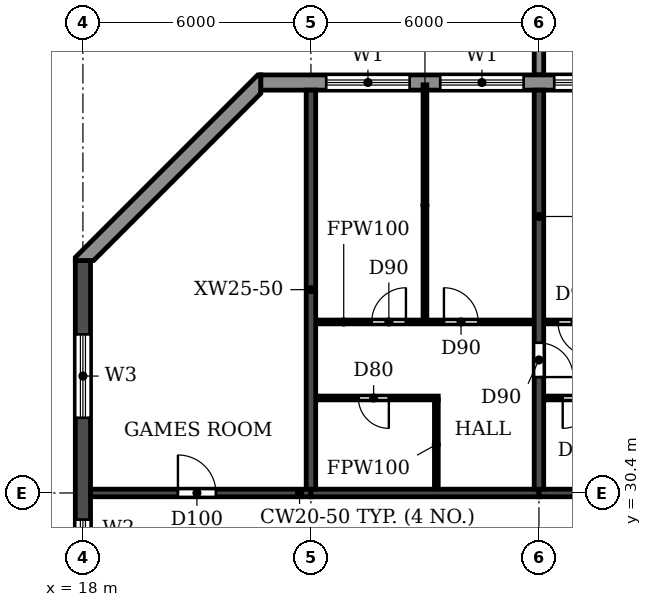
"""IFC4 building model, lengths in metres.
Left out: names, types, materials, properties, quantities, classifications, styles, units other than length and angle.
Written with IfcOpenShell. Run it as: python <this file> out.ifc"""

import sys

from ifc_helpers import new_model, si_unit, direction, frame, frame_2d, origin, place, context, subcontext, project, spatial, polyline, rectangle, outline, extrude, source, transform, mapped, element, fill, save


model = new_model("IFC4")
c1 = context("Model", 3, precision=1e-05, world=origin(), true_north=direction((0.0, 1.0)))
c2 = subcontext(c1, "Body", "Model", "MODEL_VIEW")
j1 = project(units=[si_unit("LENGTHUNIT", "METRE"), si_unit("PLANEANGLEUNIT", "RADIAN")], contexts=[c1])
p1 = place(None, origin())
s1 = spatial("IfcSite", under=j1, at=p1, CompositionType="ELEMENT")
p2 = place(p1, origin())
s2 = spatial("IfcBuilding", under=s1, at=p2, CompositionType="ELEMENT")
p3 = place(p2, frame((0.0, 0.0, 257.7)))
s3 = spatial("IfcBuildingStorey", under=s2, at=p3, CompositionType="ELEMENT", Elevation=257.7)
p4 = place(p3, frame((24.0, 30.5, 0.0), z_axis=(0.0, 0.0, 1.0), x_axis=(0.0, 1.0, 0.0)))
e1 = element("IfcWall", 1, at=p4, inside=s3, PredefinedType="SHEAR", context=c2, shape_type="SweptSolid", body=[
    extrude(rectangle(XDim=10.5, YDim=0.25, at=frame_2d((5.25, 0.0))), origin(), (0.0, 0.0, 1.0), 3.0),
])
p5 = place(p3, frame((30.0, 30.5, 0.0), z_axis=(0.0, 0.0, 1.0), x_axis=(0.0, 1.0, 0.0)))
e2 = element("IfcWall", 2, at=p5, inside=s3, PredefinedType="SHEAR", context=c2, shape_type="SweptSolid", body=[
    extrude(rectangle(XDim=10.5, YDim=0.25, at=frame_2d((5.25, 0.0))), origin(), (0.0, 0.0, 1.0), 2.1),
])
p6 = place(p5, frame((2.95, 0.0, 0.0)))
e3 = element("IfcOpeningElement", 3, at=p6, cuts=e2, PredefinedType="OPENING", context=c2, shape_type="SweptSolid", body=[
    extrude(rectangle(XDim=0.9, YDim=2.1, at=frame_2d((0.45, 1.05))), frame((0.0, 0.135, 0.0), z_axis=(0.0, -1.0, 0.0), x_axis=(1.0, 0.0, 0.0)), (0.0, 0.0, 1.0), 0.27),
])
p7 = place(p3, frame((18.0, 4.683, 0.0), z_axis=(0.0, 0.0, 1.0), x_axis=(0.0, 1.0, 0.0)))
e4 = element("IfcWall", 4, at=p7, inside=s3, PredefinedType="SHEAR", context=c2, shape_type="SweptSolid", body=[
    extrude(rectangle(XDim=31.834, YDim=0.4, at=frame_2d((15.917, 0.0))), origin(), (0.0, 0.0, 1.0), 3.0),
])
p8 = place(p7, frame((23.817, 0.0, 0.9)))
e5 = element("IfcOpeningElement", 5, at=p8, cuts=e4, PredefinedType="OPENING", context=c2, shape_type="SweptSolid", body=[
    extrude(rectangle(XDim=1.2, YDim=1.5, at=frame_2d((0.6, 0.75))), frame((0.0, 0.21, 0.0), z_axis=(0.0, -1.0, 0.0), x_axis=(1.0, 0.0, 0.0)), (0.0, 0.0, 1.0), 0.42),
])
p9 = place(p7, frame((8.017, 0.0, 0.9)))
e6 = element("IfcOpeningElement", 6, at=p9, cuts=e4, PredefinedType="OPENING", context=c2, shape_type="SweptSolid", body=[
    extrude(rectangle(XDim=1.2, YDim=1.5, at=frame_2d((0.6, 0.75))), frame((0.0, 0.21, 0.0), z_axis=(0.0, -1.0, 0.0), x_axis=(1.0, 0.0, 0.0)), (0.0, 0.0, 1.0), 0.42),
])
p10 = place(p7, frame((27.694, 0.0, 0.6)))
e7 = element("IfcOpeningElement", 7, at=p10, cuts=e4, PredefinedType="OPENING", context=c2, shape_type="SweptSolid", body=[
    extrude(rectangle(XDim=2.2, YDim=1.8, at=frame_2d((1.1, 0.9))), frame((0.0, 0.21, 0.0), z_axis=(0.0, -1.0, 0.0), x_axis=(1.0, 0.0, 0.0)), (0.0, 0.0, 1.0), 0.42),
])
p11 = place(p7, frame((2.541, 0.0, 0.6)))
e8 = element("IfcOpeningElement", 8, at=p11, cuts=e4, PredefinedType="OPENING", context=c2, shape_type="SweptSolid", body=[
    extrude(rectangle(XDim=2.2, YDim=1.8, at=frame_2d((1.1, 0.9))), frame((0.0, 0.21, 0.0), z_axis=(0.0, -1.0, 0.0), x_axis=(1.0, 0.0, 0.0)), (0.0, 0.0, 1.0), 0.42),
])
p12 = place(p7, frame((15.917, 0.0, 0.9)))
e9 = element("IfcOpeningElement", 9, at=p12, cuts=e4, PredefinedType="OPENING", context=c2, shape_type="SweptSolid", body=[
    extrude(rectangle(XDim=1.2, YDim=1.5, at=frame_2d((0.6, 0.75))), frame((0.0, 0.21, 0.0), z_axis=(0.0, -1.0, 0.0), x_axis=(1.0, 0.0, 0.0)), (0.0, 0.0, 1.0), 0.42),
])
p13 = place(p3, frame((18.2, 30.4, 0.0), z_axis=(0.0, 0.0, 1.0), x_axis=(1.0, 0.0, 0.0)))
e10 = element("IfcWall", 10, at=p13, inside=s3, PredefinedType="SHEAR", context=c2, shape_type="SweptSolid", body=[
    extrude(rectangle(XDim=5.8, YDim=0.2, at=frame_2d((2.9, 0.0))), origin(), (0.0, 0.0, 1.0), 2.4),
])
p14 = place(p13, frame((2.3, 0.0, 0.0)))
e11 = element("IfcOpeningElement", 11, at=p14, cuts=e10, PredefinedType="OPENING", context=c2, shape_type="SweptSolid", body=[
    extrude(rectangle(XDim=1.0, YDim=2.1, at=frame_2d((0.5, 1.05))), frame((0.0, 0.11, 0.0), z_axis=(0.0, -1.0, 0.0), x_axis=(1.0, 0.0, 0.0)), (0.0, 0.0, 1.0), 0.22),
])
p15 = place(p3, frame((24.0, 30.4, 0.0), z_axis=(0.0, 0.0, 1.0), x_axis=(1.0, 0.0, 0.0)))
e12 = element("IfcWall", 12, at=p15, inside=s3, PredefinedType="SHEAR", context=c2, shape_type="SweptSolid", body=[
    extrude(rectangle(XDim=6.0, YDim=0.2, at=frame_2d((3.0, 0.0))), origin(), (0.0, 0.0, 1.0), 2.4),
])
p16 = place(p3, frame((30.0, 30.4, 0.0), z_axis=(0.0, 0.0, 1.0), x_axis=(1.0, 0.0, 0.0)))
e13 = element("IfcWall", 13, at=p16, inside=s3, PredefinedType="SHEAR", context=c2, shape_type="SweptSolid", body=[
    extrude(rectangle(XDim=6.0, YDim=0.2, at=frame_2d((3.0, 0.0))), origin(), (0.0, 0.0, 1.0), 2.4),
])
p17 = place(p16, frame((2.45, 0.0, 0.0)))
e14 = element("IfcOpeningElement", 14, at=p17, cuts=e13, PredefinedType="OPENING", context=c2, shape_type="SweptSolid", body=[
    extrude(rectangle(XDim=1.0, YDim=2.1, at=frame_2d((0.5, 1.05))), frame((0.0, 0.11, 0.0), z_axis=(0.0, -1.0, 0.0), x_axis=(1.0, 0.0, 0.0)), (0.0, 0.0, 1.0), 0.22),
])
p18 = place(p3, frame((79.317, 41.2, 0.0), z_axis=(0.0, 0.0, 1.0), x_axis=(-1.0, 0.0, 0.0)))
e15 = element("IfcWall", 15, at=p18, inside=s3, PredefinedType="STANDARD", context=c2, shape_type="SweptSolid", body=[
    extrude(rectangle(XDim=56.634, YDim=0.4, at=frame_2d((28.317, 0.0))), origin(), (0.0, 0.0, 1.0), 3.0),
])
p19 = place(p18, frame((52.717, 0.0, 0.9)))
e16 = element("IfcOpeningElement", 16, at=p19, cuts=e15, PredefinedType="OPENING", context=c2, shape_type="SweptSolid", body=[
    extrude(rectangle(XDim=2.2, YDim=1.5, at=frame_2d((1.1, 0.75))), frame((0.0, 0.21, 0.0), z_axis=(0.0, -1.0, 0.0), x_axis=(1.0, 0.0, 0.0)), (0.0, 0.0, 1.0), 0.42),
])
p20 = place(p18, frame((49.717, 0.0, 0.9)))
e17 = element("IfcOpeningElement", 17, at=p20, cuts=e15, PredefinedType="OPENING", context=c2, shape_type="SweptSolid", body=[
    extrude(rectangle(XDim=2.2, YDim=1.5, at=frame_2d((1.1, 0.75))), frame((0.0, 0.21, 0.0), z_axis=(0.0, -1.0, 0.0), x_axis=(1.0, 0.0, 0.0)), (0.0, 0.0, 1.0), 0.42),
])
p21 = place(p18, frame((46.717, 0.0, 0.9)))
e18 = element("IfcOpeningElement", 18, at=p21, cuts=e15, PredefinedType="OPENING", context=c2, shape_type="SweptSolid", body=[
    extrude(rectangle(XDim=2.2, YDim=1.5, at=frame_2d((1.1, 0.75))), frame((0.0, 0.21, 0.0), z_axis=(0.0, -1.0, 0.0), x_axis=(1.0, 0.0, 0.0)), (0.0, 0.0, 1.0), 0.42),
])
p22 = place(p18, frame((43.917, 0.0, 0.0)))
e19 = element("IfcOpeningElement", 19, at=p22, cuts=e15, PredefinedType="OPENING", context=c2, shape_type="SweptSolid", body=[
    extrude(rectangle(XDim=1.8, YDim=2.4, at=frame_2d((0.9, 1.2))), frame((0.0, 0.21, 0.0), z_axis=(0.0, -1.0, 0.0), x_axis=(1.0, 0.0, 0.0)), (0.0, 0.0, 1.0), 0.42),
])
p23 = place(p18, frame((40.717, 0.0, 0.9)))
e20 = element("IfcOpeningElement", 20, at=p23, cuts=e15, PredefinedType="OPENING", context=c2, shape_type="SweptSolid", body=[
    extrude(rectangle(XDim=2.2, YDim=1.5, at=frame_2d((1.1, 0.75))), frame((0.0, 0.21, 0.0), z_axis=(0.0, -1.0, 0.0), x_axis=(1.0, 0.0, 0.0)), (0.0, 0.0, 1.0), 0.42),
])
p24 = place(p18, frame((37.917, 0.0, 0.0)))
e21 = element("IfcOpeningElement", 21, at=p24, cuts=e15, PredefinedType="OPENING", context=c2, shape_type="SweptSolid", body=[
    extrude(rectangle(XDim=1.8, YDim=2.4, at=frame_2d((0.9, 1.2))), frame((0.0, 0.21, 0.0), z_axis=(0.0, -1.0, 0.0), x_axis=(1.0, 0.0, 0.0)), (0.0, 0.0, 1.0), 0.42),
])
p25 = place(p18, frame((34.717, 0.0, 0.9)))
e22 = element("IfcOpeningElement", 22, at=p25, cuts=e15, PredefinedType="OPENING", context=c2, shape_type="SweptSolid", body=[
    extrude(rectangle(XDim=2.2, YDim=1.5, at=frame_2d((1.1, 0.75))), frame((0.0, 0.21, 0.0), z_axis=(0.0, -1.0, 0.0), x_axis=(1.0, 0.0, 0.0)), (0.0, 0.0, 1.0), 0.42),
])
p26 = place(p18, frame((31.717, 0.0, 0.9)))
e23 = element("IfcOpeningElement", 23, at=p26, cuts=e15, PredefinedType="OPENING", context=c2, shape_type="SweptSolid", body=[
    extrude(rectangle(XDim=2.2, YDim=1.5, at=frame_2d((1.1, 0.75))), frame((0.0, 0.21, 0.0), z_axis=(0.0, -1.0, 0.0), x_axis=(1.0, 0.0, 0.0)), (0.0, 0.0, 1.0), 0.42),
])
p27 = place(p18, frame((28.717, 0.0, 0.9)))
e24 = element("IfcOpeningElement", 24, at=p27, cuts=e15, PredefinedType="OPENING", context=c2, shape_type="SweptSolid", body=[
    extrude(rectangle(XDim=2.2, YDim=1.5, at=frame_2d((1.1, 0.75))), frame((0.0, 0.21, 0.0), z_axis=(0.0, -1.0, 0.0), x_axis=(1.0, 0.0, 0.0)), (0.0, 0.0, 1.0), 0.42),
])
p28 = place(p18, frame((25.917, 0.0, 0.0)))
e25 = element("IfcOpeningElement", 25, at=p28, cuts=e15, PredefinedType="OPENING", context=c2, shape_type="SweptSolid", body=[
    extrude(rectangle(XDim=1.8, YDim=2.4, at=frame_2d((0.9, 1.2))), frame((0.0, 0.21, 0.0), z_axis=(0.0, -1.0, 0.0), x_axis=(1.0, 0.0, 0.0)), (0.0, 0.0, 1.0), 0.42),
])
p29 = place(p18, frame((22.917, 0.0, 0.0)))
e26 = element("IfcOpeningElement", 26, at=p29, cuts=e15, PredefinedType="OPENING", context=c2, shape_type="SweptSolid", body=[
    extrude(rectangle(XDim=1.8, YDim=2.4, at=frame_2d((0.9, 1.2))), frame((0.0, 0.21, 0.0), z_axis=(0.0, -1.0, 0.0), x_axis=(1.0, 0.0, 0.0)), (0.0, 0.0, 1.0), 0.42),
])
p30 = place(p18, frame((19.717, 0.0, 0.9)))
e27 = element("IfcOpeningElement", 27, at=p30, cuts=e15, PredefinedType="OPENING", context=c2, shape_type="SweptSolid", body=[
    extrude(rectangle(XDim=2.2, YDim=1.5, at=frame_2d((1.1, 0.75))), frame((0.0, 0.21, 0.0), z_axis=(0.0, -1.0, 0.0), x_axis=(1.0, 0.0, 0.0)), (0.0, 0.0, 1.0), 0.42),
])
p31 = place(p18, frame((16.717, 0.0, 0.9)))
e28 = element("IfcOpeningElement", 28, at=p31, cuts=e15, PredefinedType="OPENING", context=c2, shape_type="SweptSolid", body=[
    extrude(rectangle(XDim=2.2, YDim=1.5, at=frame_2d((1.1, 0.75))), frame((0.0, 0.21, 0.0), z_axis=(0.0, -1.0, 0.0), x_axis=(1.0, 0.0, 0.0)), (0.0, 0.0, 1.0), 0.42),
])
p32 = place(p18, frame((13.717, 0.0, 0.9)))
e29 = element("IfcOpeningElement", 29, at=p32, cuts=e15, PredefinedType="OPENING", context=c2, shape_type="SweptSolid", body=[
    extrude(rectangle(XDim=2.2, YDim=1.5, at=frame_2d((1.1, 0.75))), frame((0.0, 0.21, 0.0), z_axis=(0.0, -1.0, 0.0), x_axis=(1.0, 0.0, 0.0)), (0.0, 0.0, 1.0), 0.42),
])
p33 = place(p18, frame((10.717, 0.0, 0.9)))
e30 = element("IfcOpeningElement", 30, at=p33, cuts=e15, PredefinedType="OPENING", context=c2, shape_type="SweptSolid", body=[
    extrude(rectangle(XDim=2.2, YDim=1.5, at=frame_2d((1.1, 0.75))), frame((0.0, 0.21, 0.0), z_axis=(0.0, -1.0, 0.0), x_axis=(1.0, 0.0, 0.0)), (0.0, 0.0, 1.0), 0.42),
])
p34 = place(p18, frame((7.917, 0.0, 0.0)))
e31 = element("IfcOpeningElement", 31, at=p34, cuts=e15, PredefinedType="OPENING", context=c2, shape_type="SweptSolid", body=[
    extrude(rectangle(XDim=1.8, YDim=2.4, at=frame_2d((0.9, 1.2))), frame((0.0, 0.21, 0.0), z_axis=(0.0, -1.0, 0.0), x_axis=(1.0, 0.0, 0.0)), (0.0, 0.0, 1.0), 0.42),
])
p35 = place(p18, frame((4.717, 0.0, 0.9)))
e32 = element("IfcOpeningElement", 32, at=p35, cuts=e15, PredefinedType="OPENING", context=c2, shape_type="SweptSolid", body=[
    extrude(rectangle(XDim=2.2, YDim=1.5, at=frame_2d((1.1, 0.75))), frame((0.0, 0.21, 0.0), z_axis=(0.0, -1.0, 0.0), x_axis=(1.0, 0.0, 0.0)), (0.0, 0.0, 1.0), 0.42),
])
p36 = place(p18, frame((1.917, 0.0, 0.0)))
e33 = element("IfcOpeningElement", 33, at=p36, cuts=e15, PredefinedType="OPENING", context=c2, shape_type="SweptSolid", body=[
    extrude(rectangle(XDim=1.8, YDim=2.4, at=frame_2d((0.9, 1.2))), frame((0.0, 0.21, 0.0), z_axis=(0.0, -1.0, 0.0), x_axis=(1.0, 0.0, 0.0)), (0.0, 0.0, 1.0), 0.42),
])
p37 = place(p3, origin())
e34 = element("IfcWall", 34, at=p37, inside=s3, PredefinedType="STANDARD", context=c2, shape_type="SweptSolid", body=[
    extrude(outline(polyline([(22.683, 41.4), (22.6, 41.4), (17.8, 36.6), (17.8, 36.517), (18.283, 36.517), (22.683, 40.917), (22.683, 41.4)])), origin(), (0.0, 0.0, 1.0), 3.0),
])
m1 = source(origin(), c2, "Body", "SweptSolid", [
    extrude(outline(polyline([(0.0, 0.0), (0.25, 0.0), (0.25, 3.1), (0.0, 3.1), (0.0, 0.0)])), origin(), (0.0, 0.0, 1.0), 2.1),
])
p38 = place(p3, frame((29.875, 41.4, 0.0)))
e35 = element("IfcWall", 35, at=p38, inside=s3, PredefinedType="STANDARD", context=c2, shape_type="MappedRepresentation", body=[
    mapped(m1, transform((0.0, 0.0, 0.0))),
])
p39 = place(p3, frame((24.135, 32.9, 0.0), z_axis=(0.0, 0.0, 1.0), x_axis=(1.0, 0.0, 0.0)))
e36 = element("IfcWall", 36, at=p39, inside=s3, PredefinedType="PARTITIONING", context=c2, shape_type="SweptSolid", body=[
    extrude(rectangle(XDim=3.215, YDim=0.1, at=frame_2d((1.607, 0.0))), origin(), (0.0, 0.0, 1.0), 3.0),
])
p40 = place(p39, frame((1.115, 0.0, 0.0)))
e37 = element("IfcOpeningElement", 37, at=p40, cuts=e36, PredefinedType="OPENING", context=c2, shape_type="SweptSolid", body=[
    extrude(rectangle(XDim=0.8, YDim=2.1, at=frame_2d((0.4, 1.05))), frame((0.0, 0.06, 0.0), z_axis=(0.0, -1.0, 0.0), x_axis=(1.0, 0.0, 0.0)), (0.0, 0.0, 1.0), 0.12),
])
p41 = place(p3, frame((30.135, 32.9, 0.0), z_axis=(0.0, 0.0, 1.0), x_axis=(1.0, 0.0, 0.0)))
e38 = element("IfcWall", 38, at=p41, inside=s3, PredefinedType="PARTITIONING", context=c2, shape_type="SweptSolid", body=[
    extrude(rectangle(XDim=1.965, YDim=0.1, at=frame_2d((0.982, 0.0))), origin(), (0.0, 0.0, 1.0), 3.0),
])
p42 = place(p41, frame((0.49, 0.0, 0.0)))
e39 = element("IfcOpeningElement", 39, at=p42, cuts=e38, PredefinedType="OPENING", context=c2, shape_type="SweptSolid", body=[
    extrude(rectangle(XDim=0.8, YDim=2.1, at=frame_2d((0.4, 1.05))), frame((0.0, 0.06, 0.0), z_axis=(0.0, -1.0, 0.0), x_axis=(1.0, 0.0, 0.0)), (0.0, 0.0, 1.0), 0.12),
])
p43 = place(p3, frame((24.135, 34.9, 0.0), z_axis=(0.0, 0.0, 1.0), x_axis=(1.0, 0.0, 0.0)))
e40 = element("IfcWall", 40, at=p43, inside=s3, PredefinedType="PARTITIONING", context=c2, shape_type="SweptSolid", body=[
    extrude(rectangle(XDim=5.73, YDim=0.1, at=frame_2d((2.865, 0.0))), origin(), (0.0, 0.0, 1.0), 3.0),
])
p44 = place(p43, frame((1.465, 0.0, 0.0)))
e41 = element("IfcOpeningElement", 41, at=p44, cuts=e40, PredefinedType="OPENING", context=c2, shape_type="SweptSolid", body=[
    extrude(rectangle(XDim=0.9, YDim=2.1, at=frame_2d((0.45, 1.05))), frame((0.0, 0.06, 0.0), z_axis=(0.0, -1.0, 0.0), x_axis=(1.0, 0.0, 0.0)), (0.0, 0.0, 1.0), 0.12),
])
p45 = place(p43, frame((3.365, 0.0, 0.0)))
e42 = element("IfcOpeningElement", 42, at=p45, cuts=e40, PredefinedType="OPENING", context=c2, shape_type="SweptSolid", body=[
    extrude(rectangle(XDim=0.9, YDim=2.1, at=frame_2d((0.45, 1.05))), frame((0.0, 0.06, 0.0), z_axis=(0.0, -1.0, 0.0), x_axis=(1.0, 0.0, 0.0)), (0.0, 0.0, 1.0), 0.12),
])
p46 = place(p3, frame((30.135, 34.9, 0.0), z_axis=(0.0, 0.0, 1.0), x_axis=(1.0, 0.0, 0.0)))
e43 = element("IfcWall", 43, at=p46, inside=s3, PredefinedType="PARTITIONING", context=c2, shape_type="SweptSolid", body=[
    extrude(rectangle(XDim=2.915, YDim=0.1, at=frame_2d((1.458, 0.0))), origin(), (0.0, 0.0, 1.0), 3.0),
])
p47 = place(p46, frame((0.365, 0.0, 0.0)))
e44 = element("IfcOpeningElement", 44, at=p47, cuts=e43, PredefinedType="OPENING", context=c2, shape_type="SweptSolid", body=[
    extrude(rectangle(XDim=0.9, YDim=2.1, at=frame_2d((0.45, 1.05))), frame((0.0, 0.06, 0.0), z_axis=(0.0, -1.0, 0.0), x_axis=(1.0, 0.0, 0.0)), (0.0, 0.0, 1.0), 0.12),
])
p48 = place(p3, frame((27.0, 34.95, 0.0), z_axis=(0.0, 0.0, 1.0), x_axis=(0.0, 1.0, 0.0)))
e45 = element("IfcWall", 45, at=p48, inside=s3, PredefinedType="PARTITIONING", context=c2, shape_type="SweptSolid", body=[
    extrude(rectangle(XDim=6.19, YDim=0.1, at=frame_2d((3.095, 0.0))), origin(), (0.0, 0.0, 1.0), 3.0),
])
p49 = place(p3, frame((27.3, 30.51, 0.0), z_axis=(0.0, 0.0, 1.0), x_axis=(0.0, 1.0, 0.0)))
e46 = element("IfcWall", 46, at=p49, inside=s3, PredefinedType="PARTITIONING", context=c2, shape_type="SweptSolid", body=[
    extrude(rectangle(XDim=2.34, YDim=0.1, at=frame_2d((1.17, 0.0))), origin(), (0.0, 0.0, 1.0), 3.0),
])
p50 = place(p19, origin())
e47 = element("IfcWindow", 47, at=p50, inside=s3, PartitioningType="DOUBLE_PANEL_HORIZONTAL", PredefinedType="WINDOW", context=c2, shape_type="SweptSolid", body=[
    extrude(rectangle(XDim=2.2, YDim=1.5, at=frame_2d((1.1, 0.75))), frame((0.0, 0.03, 0.0), z_axis=(0.0, -1.0, 0.0), x_axis=(1.0, 0.0, 0.0)), (0.0, 0.0, 1.0), 0.06),
])
fill(e16, e47)
p51 = place(p20, origin())
e48 = element("IfcWindow", 48, at=p51, inside=s3, PartitioningType="DOUBLE_PANEL_HORIZONTAL", PredefinedType="WINDOW", context=c2, shape_type="SweptSolid", body=[
    extrude(rectangle(XDim=2.2, YDim=1.5, at=frame_2d((1.1, 0.75))), frame((0.0, 0.03, 0.0), z_axis=(0.0, -1.0, 0.0), x_axis=(1.0, 0.0, 0.0)), (0.0, 0.0, 1.0), 0.06),
])
fill(e17, e48)
p52 = place(p21, origin())
e49 = element("IfcWindow", 49, at=p52, inside=s3, PartitioningType="DOUBLE_PANEL_HORIZONTAL", PredefinedType="WINDOW", context=c2, shape_type="SweptSolid", body=[
    extrude(rectangle(XDim=2.2, YDim=1.5, at=frame_2d((1.1, 0.75))), frame((0.0, 0.03, 0.0), z_axis=(0.0, -1.0, 0.0), x_axis=(1.0, 0.0, 0.0)), (0.0, 0.0, 1.0), 0.06),
])
fill(e18, e49)
p53 = place(p8, origin())
e50 = element("IfcWindow", 50, at=p53, inside=s3, PartitioningType="SINGLE_PANEL", PredefinedType="WINDOW", context=c2, shape_type="SweptSolid", body=[
    extrude(rectangle(XDim=1.2, YDim=1.5, at=frame_2d((0.6, 0.75))), frame((0.0, 0.03, 0.0), z_axis=(0.0, -1.0, 0.0), x_axis=(1.0, 0.0, 0.0)), (0.0, 0.0, 1.0), 0.06),
])
fill(e5, e50)
p54 = place(p10, origin())
e51 = element("IfcWindow", 51, at=p54, inside=s3, PartitioningType="DOUBLE_PANEL_HORIZONTAL", PredefinedType="WINDOW", context=c2, shape_type="SweptSolid", body=[
    extrude(rectangle(XDim=2.2, YDim=1.8, at=frame_2d((1.1, 0.9))), frame((0.0, 0.03, 0.0), z_axis=(0.0, -1.0, 0.0), x_axis=(1.0, 0.0, 0.0)), (0.0, 0.0, 1.0), 0.06),
])
fill(e7, e51)
p55 = place(p14, origin())
e52 = element("IfcDoor", 52, at=p55, inside=s3, OperationType="SINGLE_SWING_LEFT", PredefinedType="DOOR", context=c2, shape_type="SweptSolid", body=[
    extrude(rectangle(XDim=1.0, YDim=2.1, at=frame_2d((0.5, 1.05))), frame((0.0, 0.025, 0.0), z_axis=(0.0, -1.0, 0.0), x_axis=(1.0, 0.0, 0.0)), (0.0, 0.0, 1.0), 0.05),
])
fill(e11, e52)
p56 = place(p40, frame((0.8, 0.0, 0.0), z_axis=(0.0, 0.0, 1.0), x_axis=(-1.0, 0.0, 0.0)))
e53 = element("IfcDoor", 53, at=p56, inside=s3, OperationType="SINGLE_SWING_LEFT", PredefinedType="DOOR", context=c2, shape_type="SweptSolid", body=[
    extrude(rectangle(XDim=0.8, YDim=2.1, at=frame_2d((0.4, 1.05))), frame((0.0, 0.025, 0.0), z_axis=(0.0, -1.0, 0.0), x_axis=(1.0, 0.0, 0.0)), (0.0, 0.0, 1.0), 0.05),
])
fill(e37, e53)
p57 = place(p44, origin())
e54 = element("IfcDoor", 54, at=p57, inside=s3, OperationType="SINGLE_SWING_RIGHT", PredefinedType="DOOR", context=c2, shape_type="SweptSolid", body=[
    extrude(rectangle(XDim=0.9, YDim=2.1, at=frame_2d((0.45, 1.05))), frame((0.0, 0.025, 0.0), z_axis=(0.0, -1.0, 0.0), x_axis=(1.0, 0.0, 0.0)), (0.0, 0.0, 1.0), 0.05),
])
fill(e41, e54)
p58 = place(p45, origin())
e55 = element("IfcDoor", 55, at=p58, inside=s3, OperationType="SINGLE_SWING_LEFT", PredefinedType="DOOR", context=c2, shape_type="SweptSolid", body=[
    extrude(rectangle(XDim=0.9, YDim=2.1, at=frame_2d((0.45, 1.05))), frame((0.0, 0.025, 0.0), z_axis=(0.0, -1.0, 0.0), x_axis=(1.0, 0.0, 0.0)), (0.0, 0.0, 1.0), 0.05),
])
fill(e42, e55)
p59 = place(p6, frame((0.9, 0.0, 0.0), z_axis=(0.0, 0.0, 1.0), x_axis=(-1.0, 0.0, 0.0)))
e56 = element("IfcDoor", 56, at=p59, inside=s3, OperationType="SINGLE_SWING_RIGHT", PredefinedType="DOOR", context=c2, shape_type="SweptSolid", body=[
    extrude(rectangle(XDim=0.9, YDim=2.1, at=frame_2d((0.45, 1.05))), frame((0.0, 0.025, 0.0), z_axis=(0.0, -1.0, 0.0), x_axis=(1.0, 0.0, 0.0)), (0.0, 0.0, 1.0), 0.05),
])
fill(e3, e56)
p60 = place(p47, frame((0.9, 0.0, 0.0), z_axis=(0.0, 0.0, 1.0), x_axis=(-1.0, 0.0, 0.0)))
e57 = element("IfcDoor", 57, at=p60, inside=s3, OperationType="SINGLE_SWING_LEFT", PredefinedType="DOOR", context=c2, shape_type="SweptSolid", body=[
    extrude(rectangle(XDim=0.9, YDim=2.1, at=frame_2d((0.45, 1.05))), frame((0.0, 0.025, 0.0), z_axis=(0.0, -1.0, 0.0), x_axis=(1.0, 0.0, 0.0)), (0.0, 0.0, 1.0), 0.05),
])
fill(e44, e57)
p61 = place(p42, frame((0.8, 0.0, 0.0), z_axis=(0.0, 0.0, 1.0), x_axis=(-1.0, 0.0, 0.0)))
e58 = element("IfcDoor", 58, at=p61, inside=s3, OperationType="SINGLE_SWING_RIGHT", PredefinedType="DOOR", context=c2, shape_type="SweptSolid", body=[
    extrude(rectangle(XDim=0.8, YDim=2.1, at=frame_2d((0.4, 1.05))), frame((0.0, 0.025, 0.0), z_axis=(0.0, -1.0, 0.0), x_axis=(1.0, 0.0, 0.0)), (0.0, 0.0, 1.0), 0.05),
])
fill(e39, e58)
save(model, sys.argv[1])
